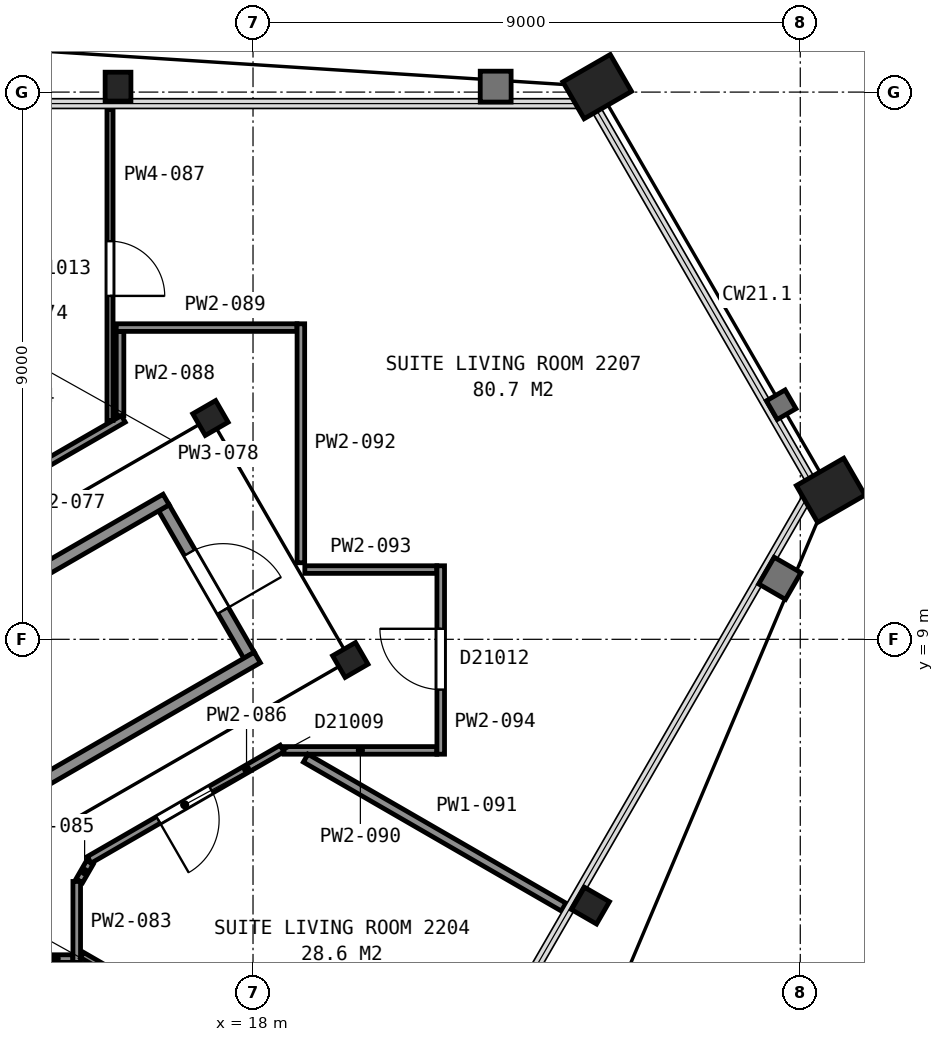
"""IFC4 building model, lengths in metres.
Left out: names, types, materials, properties, quantities, classifications, styles, units other than length and angle.
Written with IfcOpenShell. Run it as: python <this file> out.ifc"""

import sys

from ifc_helpers import new_model, si_unit, direction, frame, frame_2d, origin, origin_2d, place, context, subcontext, project, spatial, rectangle, hollow_rectangle, i_section, extrude, element, fill, save


model = new_model("IFC4")
c1 = context("Model", 3, precision=1e-05, world=origin(), true_north=direction((0.0, 1.0)))
c2 = subcontext(c1, "Body", "Model", "MODEL_VIEW")
j1 = project(units=[si_unit("LENGTHUNIT", "METRE"), si_unit("PLANEANGLEUNIT", "RADIAN")], contexts=[c1])
p1 = place(None, origin())
s1 = spatial("IfcSite", under=j1, at=p1, CompositionType="ELEMENT")
p2 = place(p1, origin())
s2 = spatial("IfcBuilding", under=s1, at=p2, CompositionType="ELEMENT")
p3 = place(p2, frame((0.0, 0.0, 96.4)))
s3 = spatial("IfcBuildingStorey", under=s2, at=p3, CompositionType="ELEMENT", Elevation=96.4)
p4 = place(p3, frame((23.66, 18.09, 0.0), z_axis=(0.0, 0.0, 1.0), x_axis=(0.5, -0.866025403784, 0.0)))
e1 = element("IfcColumn", 1, at=p4, inside=s3, PredefinedType="COLUMN", context=c2, shape_type="SweptSolid", body=[
    extrude(hollow_rectangle(XDim=0.7, YDim=0.9, WallThickness=0.065, at=origin_2d()), origin(), (0.0, 0.0, 1.0), 3.525),
])
for number, where, z_axis, x_axis in (
    (2, (15.78, 18.09, 0.0), (0.0, 0.0, 1.0), (1.0, 0.0, 0.0)),
    (3, (23.55, 4.62, 0.0), (0.0, 0.0, 1.0), (-0.5, -0.866, 0.0)),
):
    element("IfcColumn", number, at=place(p3, frame(where, z_axis=z_axis, x_axis=x_axis)), inside=s3, PredefinedType="COLUMN", context=c2, shape_type="SweptSolid", body=[
        extrude(i_section(OverallWidth=0.424, OverallDepth=0.475, WebThickness=0.048, FlangeThickness=0.077, FilletRadius=0.015, at=origin_2d()), origin(), (0.0, 0.0, 1.0), 3.555),
    ])
p5 = place(p3, frame((27.5, 11.45, 0.0), z_axis=(0.0, 0.0, 1.0), x_axis=(0.5, -0.866025403784, 0.0)))
e4 = element("IfcColumn", 4, at=p5, inside=s3, PredefinedType="COLUMN", context=c2, shape_type="SweptSolid", body=[
    extrude(hollow_rectangle(XDim=0.7, YDim=0.9, WallThickness=0.065, at=origin_2d()), origin(), (0.0, 0.0, 1.0), 3.525),
])
for number, where, z_axis, x_axis in (
    (5, (19.6, 8.66, 0.0), (0.0, 0.0, 1.0), (0.5, -0.866, 0.0)),
    (6, (17.3, 12.64, 0.0), (0.0, 0.0, 1.0), (0.5, -0.866, 0.0)),
):
    element("IfcColumn", number, at=place(p3, frame(where, z_axis=z_axis, x_axis=x_axis)), inside=s3, PredefinedType="COLUMN", context=c2, shape_type="SweptSolid", body=[
        extrude(i_section(OverallWidth=0.411, OverallDepth=0.434, WebThickness=0.036, FlangeThickness=0.057, FilletRadius=0.015, at=origin_2d()), origin(), (0.0, 0.0, 1.0), 3.6),
    ])
p6 = place(p3, frame((17.934, 8.738, 0.0), z_axis=(0.0, 0.0, 1.0), x_axis=(-0.49998411664, 0.866034573852, 0.0)))
e7 = element("IfcWall", 7, at=p6, inside=s3, PredefinedType="PARTITIONING", context=c2, shape_type="SweptSolid", body=[
    extrude(rectangle(XDim=2.8, YDim=0.2, at=frame_2d((1.4, 0.0))), origin(), (0.0, 0.0, 1.0), 3.35),
])
p7 = place(p6, frame((0.85, 0.0, 0.0)))
e8 = element("IfcOpeningElement", 8, at=p7, cuts=e7, PredefinedType="OPENING", context=c2, shape_type="SweptSolid", body=[
    extrude(rectangle(XDim=1.1, YDim=2.1, at=frame_2d((0.55, 1.05))), frame((0.0, 0.11, 0.0), z_axis=(0.0, -1.0, 0.0), x_axis=(1.0, 0.0, 0.0)), (0.0, 0.0, 1.0), 0.22),
])
for number, where, z_axis, x_axis in (
    (9, (6.178, 5.299, 0.0), (0.0, 0.0, 1.0), (0.866, 0.5, 0.0)),
    (10, (7.678, 2.701, 0.0), (0.0, 0.0, 1.0), (0.866, 0.5, 0.0)),
):
    element("IfcWall", number, at=place(p3, frame(where, z_axis=z_axis, x_axis=x_axis)), inside=s3, PredefinedType="PARTITIONING", context=c2, shape_type="SweptSolid", body=[
        extrude(rectangle(XDim=12.0, YDim=0.2, at=frame_2d((6.0, 0.0))), origin(), (0.0, 0.0, 1.0), 3.35),
    ])
p8 = place(p3, frame((12.556, 10.713, 0.0), z_axis=(0.0, 0.0, 1.0), x_axis=(0.86603035395, 0.499991425964, 0.0)))
e11 = element("IfcWall", 11, at=p8, inside=s3, PredefinedType="PARTITIONING", context=c2, shape_type="SweptSolid", body=[
    extrude(rectangle(XDim=3.824, YDim=0.125, at=frame_2d((1.912, 0.0))), origin(), (0.0, 0.0, 1.0), 2.613),
])
p9 = place(p3, frame((14.489, 3.749, 0.0), z_axis=(0.0, 0.0, 1.0), x_axis=(1.0, 0.0, 0.0)))
e12 = element("IfcWall", 12, at=p9, inside=s3, PredefinedType="PARTITIONING", context=c2, shape_type="SweptSolid", body=[
    extrude(rectangle(XDim=0.547, YDim=0.125, at=frame_2d((0.273, 0.0))), origin(), (0.0, 0.0, 1.0), 2.613),
])
p10 = place(p3, frame((15.101, 3.687, 0.0), z_axis=(0.0, 0.0, 1.0), x_axis=(0.0, 1.0, 0.0)))
e13 = element("IfcWall", 13, at=p10, inside=s3, PredefinedType="PARTITIONING", context=c2, shape_type="SweptSolid", body=[
    extrude(rectangle(XDim=1.331, YDim=0.125, at=frame_2d((0.666, 0.0))), origin(), (0.0, 0.0, 1.0), 2.613),
])
p11 = place(p3, frame((20.787, 0.575, 0.0), z_axis=(0.0, 0.0, 1.0), x_axis=(-0.866012632051, 0.500022120638, 0.0)))
e14 = element("IfcWall", 14, at=p11, inside=s3, PredefinedType="PARTITIONING", context=c2, shape_type="SweptSolid", body=[
    extrude(rectangle(XDim=6.465, YDim=0.1, at=frame_2d((3.232, 0.0))), origin(), (0.0, 0.0, 1.0), 2.613),
])
p12 = place(p11, frame((2.866, 0.0, 0.0)))
e15 = element("IfcOpeningElement", 15, at=p12, cuts=e14, PredefinedType="OPENING", context=c2, shape_type="SweptSolid", body=[
    extrude(rectangle(XDim=0.9, YDim=2.1, at=frame_2d((0.45, 1.05))), frame((0.0, 0.06, 0.0), z_axis=(0.0, -1.0, 0.0), x_axis=(1.0, 0.0, 0.0)), (0.0, 0.0, 1.0), 0.12),
])
p13 = place(p3, frame((15.144, 5.029, 0.0), z_axis=(0.0, 0.0, 1.0), x_axis=(0.499682006278, 0.86620891972, 0.0)))
e16 = element("IfcWall", 16, at=p13, inside=s3, PredefinedType="PARTITIONING", context=c2, shape_type="SweptSolid", body=[
    extrude(rectangle(XDim=0.348, YDim=0.125, at=frame_2d((0.174, 0.0))), origin(), (0.0, 0.0, 1.0), 2.613),
])
p14 = place(p3, frame((18.478, 7.204, 0.0), z_axis=(0.0, 0.0, 1.0), x_axis=(-0.866011320536, -0.500024392108, 0.0)))
e17 = element("IfcWall", 17, at=p14, inside=s3, PredefinedType="PARTITIONING", context=c2, shape_type="SweptSolid", body=[
    extrude(rectangle(XDim=3.663, YDim=0.125, at=frame_2d((1.832, 0.0))), origin(), (0.0, 0.0, 1.0), 2.613),
])
p15 = place(p14, frame((1.351, 0.0, 0.0)))
e18 = element("IfcOpeningElement", 18, at=p15, cuts=e17, PredefinedType="OPENING", context=c2, shape_type="SweptSolid", body=[
    extrude(rectangle(XDim=1.0, YDim=2.1, at=frame_2d((0.5, 1.05))), frame((0.0, 0.073, 0.0), z_axis=(0.0, -1.0, 0.0), x_axis=(1.0, 0.0, 0.0)), (0.0, 0.0, 1.0), 0.145),
])
p16 = place(p3, frame((15.648, 12.599, 0.0), z_axis=(0.0, 0.0, 1.0), x_axis=(0.0, 1.0, 0.0)))
e19 = element("IfcWall", 19, at=p16, inside=s3, PredefinedType="PARTITIONING", context=c2, shape_type="SweptSolid", body=[
    extrude(rectangle(XDim=5.116, YDim=0.1, at=frame_2d((2.558, 0.0))), origin(), (0.0, 0.0, 1.0), 2.613),
])
p17 = place(p16, frame((2.049, 0.0, 0.0)))
e20 = element("IfcOpeningElement", 20, at=p17, cuts=e19, PredefinedType="OPENING", context=c2, shape_type="SweptSolid", body=[
    extrude(rectangle(XDim=0.9, YDim=2.1, at=frame_2d((0.45, 1.05))), frame((0.0, 0.06, 0.0), z_axis=(0.0, -1.0, 0.0), x_axis=(1.0, 0.0, 0.0)), (0.0, 0.0, 1.0), 0.12),
])
p18 = place(p3, frame((15.813, 12.679, 0.0), z_axis=(0.0, 0.0, 1.0), x_axis=(0.0, 1.0, 0.0)))
e21 = element("IfcWall", 21, at=p18, inside=s3, PredefinedType="PARTITIONING", context=c2, shape_type="SweptSolid", body=[
    extrude(rectangle(XDim=1.383, YDim=0.125, at=frame_2d((0.691, 0.0))), origin(), (0.0, 0.0, 1.0), 2.613),
])
p19 = place(p3, frame((15.75, 14.127, 0.0), z_axis=(0.0, 0.0, 1.0), x_axis=(1.0, 0.0, 0.0)))
e22 = element("IfcWall", 22, at=p19, inside=s3, PredefinedType="PARTITIONING", context=c2, shape_type="SweptSolid", body=[
    extrude(rectangle(XDim=2.971, YDim=0.125, at=frame_2d((1.486, 0.0))), origin(), (0.0, 0.0, 1.0), 2.613),
])
p20 = place(p3, frame((18.509, 7.173, 0.0), z_axis=(0.0, 0.0, 1.0), x_axis=(1.0, 0.0, 0.0)))
e23 = element("IfcWall", 23, at=p20, inside=s3, PredefinedType="PARTITIONING", context=c2, shape_type="SweptSolid", body=[
    extrude(rectangle(XDim=2.513, YDim=0.125, at=frame_2d((1.256, 0.0))), origin(), (0.0, 0.0, 1.0), 2.613),
])
p21 = place(p3, frame((18.866, 7.046, 0.0), z_axis=(0.0, 0.0, 1.0), x_axis=(0.866042025588, -0.499971209087, 0.0)))
e24 = element("IfcWall", 24, at=p21, inside=s3, PredefinedType="PARTITIONING", context=c2, shape_type="SweptSolid", body=[
    extrude(rectangle(XDim=4.899, YDim=0.15, at=frame_2d((2.45, 0.0))), origin(), (0.0, 0.0, 1.0), 2.613),
])
p22 = place(p3, frame((18.787, 10.259, 0.0), z_axis=(0.0, 0.0, 1.0), x_axis=(0.0, 1.0, 0.0)))
e25 = element("IfcWall", 25, at=p22, inside=s3, PredefinedType="PARTITIONING", context=c2, shape_type="SweptSolid", body=[
    extrude(rectangle(XDim=3.93, YDim=0.125, at=frame_2d((1.965, 0.0))), origin(), (0.0, 0.0, 1.0), 2.613),
])
p23 = place(p3, frame((18.852, 10.147, 0.0), z_axis=(0.0, 0.0, 1.0), x_axis=(1.0, 0.0, 0.0)))
e26 = element("IfcWall", 26, at=p23, inside=s3, PredefinedType="PARTITIONING", context=c2, shape_type="SweptSolid", body=[
    extrude(rectangle(XDim=2.17, YDim=0.125, at=frame_2d((1.085, 0.0))), origin(), (0.0, 0.0, 1.0), 2.613),
])
p24 = place(p3, frame((21.087, 10.209, 0.0), z_axis=(0.0, 0.0, 1.0), x_axis=(0.0, -1.0, 0.0)))
e27 = element("IfcWall", 27, at=p24, inside=s3, PredefinedType="PARTITIONING", context=c2, shape_type="SweptSolid", body=[
    extrude(rectangle(XDim=3.099, YDim=0.125, at=frame_2d((1.549, 0.0))), origin(), (0.0, 0.0, 1.0), 2.613),
])
p25 = place(p24, frame((1.037, 0.0, 0.0)))
e28 = element("IfcOpeningElement", 28, at=p25, cuts=e27, PredefinedType="OPENING", context=c2, shape_type="SweptSolid", body=[
    extrude(rectangle(XDim=1.0, YDim=2.1, at=frame_2d((0.5, 1.05))), frame((0.0, 0.073, 0.0), z_axis=(0.0, -1.0, 0.0), x_axis=(1.0, 0.0, 0.0)), (0.0, 0.0, 1.0), 0.145),
])
p26 = place(p7, origin())
e29 = element("IfcDoor", 29, at=p26, inside=s3, OperationType="SINGLE_SWING_LEFT", PredefinedType="DOOR", context=c2, shape_type="SweptSolid", body=[
    extrude(rectangle(XDim=1.1, YDim=2.1, at=frame_2d((0.55, 1.05))), frame((0.0, 0.025, 0.0), z_axis=(0.0, -1.0, 0.0), x_axis=(1.0, 0.0, 0.0)), (0.0, 0.0, 1.0), 0.05),
])
fill(e8, e29)
p27 = place(p15, origin())
e30 = element("IfcDoor", 30, at=p27, inside=s3, OperationType="SINGLE_SWING_RIGHT", PredefinedType="DOOR", context=c2, shape_type="SweptSolid", body=[
    extrude(rectangle(XDim=1.0, YDim=2.1, at=frame_2d((0.5, 1.05))), frame((0.0, 0.025, 0.0), z_axis=(0.0, -1.0, 0.0), x_axis=(1.0, 0.0, 0.0)), (0.0, 0.0, 1.0), 0.05),
])
fill(e18, e30)
p28 = place(p17, origin())
e31 = element("IfcDoor", 31, at=p28, inside=s3, OperationType="SINGLE_SWING_LEFT", PredefinedType="DOOR", context=c2, shape_type="SweptSolid", body=[
    extrude(rectangle(XDim=0.9, YDim=2.1, at=frame_2d((0.45, 1.05))), frame((0.0, 0.025, 0.0), z_axis=(0.0, -1.0, 0.0), x_axis=(1.0, 0.0, 0.0)), (0.0, 0.0, 1.0), 0.05),
])
fill(e20, e31)
p29 = place(p25, origin())
e32 = element("IfcDoor", 32, at=p29, inside=s3, OperationType="SINGLE_SWING_LEFT", PredefinedType="DOOR", context=c2, shape_type="SweptSolid", body=[
    extrude(rectangle(XDim=1.0, YDim=2.1, at=frame_2d((0.5, 1.05))), frame((0.0, 0.025, 0.0), z_axis=(0.0, -1.0, 0.0), x_axis=(1.0, 0.0, 0.0)), (0.0, 0.0, 1.0), 0.05),
])
fill(e28, e32)
save(model, sys.argv[1])
